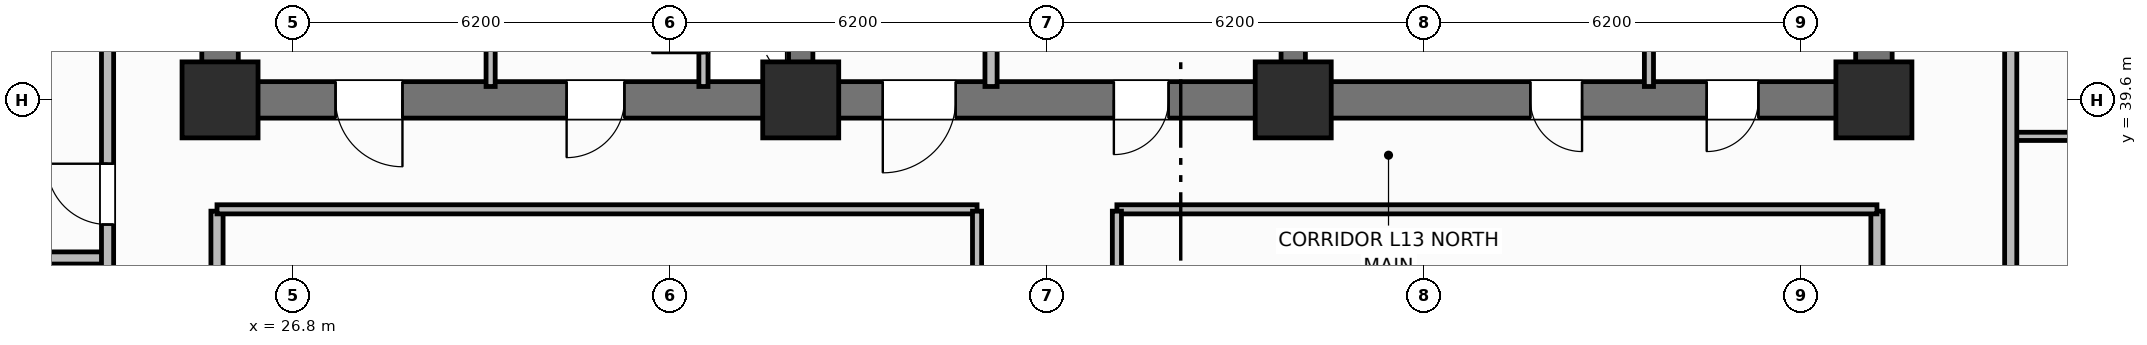
"""IFC4 building model, lengths in metres.
Left out: names, types, materials, properties, quantities, classifications, styles, units other than length and angle.
Written with IfcOpenShell. Run it as: python <this file> out.ifc"""

import sys

from ifc_helpers import new_model, si_unit, direction, frame, frame_2d, origin, origin_2d, place, context, subcontext, project, spatial, rectangle, extrude, element, fill, save


model = new_model("IFC4")
c1 = context("Model", 3, precision=1e-05, world=origin(), true_north=direction((0.0, 1.0)))
c2 = subcontext(c1, "Body", "Model", "MODEL_VIEW")
j1 = project(units=[si_unit("LENGTHUNIT", "METRE"), si_unit("PLANEANGLEUNIT", "RADIAN")], contexts=[c1])
p1 = place(None, origin())
s1 = spatial("IfcSite", under=j1, at=p1, CompositionType="ELEMENT")
p2 = place(p1, origin())
s2 = spatial("IfcBuilding", under=s1, at=p2, CompositionType="ELEMENT")
p3 = place(p2, frame((0.0, 0.0, 54.7)))
s3 = spatial("IfcBuildingStorey", under=s2, at=p3, CompositionType="ELEMENT", Elevation=54.7)
for number, where, z_axis, x_axis in (
    (1, (25.6, 39.9, 0.0), (0.0, 0.0, 1.0), (0.0, 1.0, 0.0)),
    (2, (52.8, 39.9, 0.0), (0.0, 0.0, 1.0), (0.0, 1.0, 0.0)),
):
    element("IfcWall", number, at=place(p3, frame(where, z_axis=z_axis, x_axis=x_axis)), inside=s3, PredefinedType="SHEAR", context=c2, shape_type="SweptSolid", body=[
        extrude(rectangle(XDim=5.6, YDim=0.6, at=frame_2d((2.8, 0.0))), origin(), (0.0, 0.0, 1.0), 3.7),
    ])
p4 = place(p3, frame((52.8, 39.6, 0.0), z_axis=(0.0, 0.0, 1.0), x_axis=(-1.0, 0.0, 0.0)))
e3 = element("IfcWall", 3, at=p4, inside=s3, PredefinedType="SHEAR", context=c2, shape_type="SweptSolid", body=[
    extrude(rectangle(XDim=27.2, YDim=0.6, at=frame_2d((13.6, 0.0))), origin(), (0.0, 0.0, 1.0), 3.7),
])
p5 = place(p4, frame((24.2, 0.0, 0.0)))
e4 = element("IfcOpeningElement", 4, at=p5, cuts=e3, PredefinedType="OPENING", context=c2, shape_type="SweptSolid", body=[
    extrude(rectangle(XDim=1.1, YDim=2.15, at=frame_2d((0.55, 1.075))), frame((0.0, 0.31, 0.0), z_axis=(0.0, -1.0, 0.0), x_axis=(1.0, 0.0, 0.0)), (0.0, 0.0, 1.0), 0.62),
])
p6 = place(p4, frame((20.55, 0.0, 0.0)))
e5 = element("IfcOpeningElement", 5, at=p6, cuts=e3, PredefinedType="OPENING", context=c2, shape_type="SweptSolid", body=[
    extrude(rectangle(XDim=0.95, YDim=2.1, at=frame_2d((0.475, 1.05))), frame((0.0, 0.31, 0.0), z_axis=(0.0, -1.0, 0.0), x_axis=(1.0, 0.0, 0.0)), (0.0, 0.0, 1.0), 0.62),
])
p7 = place(p4, frame((15.1, 0.0, 0.0)))
e6 = element("IfcOpeningElement", 6, at=p7, cuts=e3, PredefinedType="OPENING", context=c2, shape_type="SweptSolid", body=[
    extrude(rectangle(XDim=1.2, YDim=2.15, at=frame_2d((0.6, 1.075))), frame((0.0, 0.31, 0.0), z_axis=(0.0, -1.0, 0.0), x_axis=(1.0, 0.0, 0.0)), (0.0, 0.0, 1.0), 0.62),
])
p8 = place(p4, frame((11.6, 0.0, 0.0)))
e7 = element("IfcOpeningElement", 7, at=p8, cuts=e3, PredefinedType="OPENING", context=c2, shape_type="SweptSolid", body=[
    extrude(rectangle(XDim=0.9, YDim=2.1, at=frame_2d((0.45, 1.05))), frame((0.0, 0.31, 0.0), z_axis=(0.0, -1.0, 0.0), x_axis=(1.0, 0.0, 0.0)), (0.0, 0.0, 1.0), 0.62),
])
p9 = place(p4, frame((4.8, 0.0, 0.0)))
e8 = element("IfcOpeningElement", 8, at=p9, cuts=e3, PredefinedType="OPENING", context=c2, shape_type="SweptSolid", body=[
    extrude(rectangle(XDim=0.85, YDim=2.1, at=frame_2d((0.425, 1.05))), frame((0.0, 0.31, 0.0), z_axis=(0.0, -1.0, 0.0), x_axis=(1.0, 0.0, 0.0)), (0.0, 0.0, 1.0), 0.62),
])
p10 = place(p4, frame((1.9, 0.0, 0.0)))
e9 = element("IfcOpeningElement", 9, at=p10, cuts=e3, PredefinedType="OPENING", context=c2, shape_type="SweptSolid", body=[
    extrude(rectangle(XDim=0.85, YDim=2.1, at=frame_2d((0.425, 1.05))), frame((0.0, 0.31, 0.0), z_axis=(0.0, -1.0, 0.0), x_axis=(1.0, 0.0, 0.0)), (0.0, 0.0, 1.0), 0.62),
])
for number, where, z_axis, x_axis in (
    (10, (35.15, 39.9, 0.0), (0.0, 0.0, 1.0), (0.0, 1.0, 0.0)),
    (11, (43.25, 39.9, 0.0), (0.0, 0.0, 1.0), (0.0, 1.0, 0.0)),
):
    element("IfcWall", number, at=place(p3, frame(where, z_axis=z_axis, x_axis=x_axis)), inside=s3, PredefinedType="SHEAR", context=c2, shape_type="SweptSolid", body=[
        extrude(rectangle(XDim=5.6, YDim=0.4, at=frame_2d((2.8, 0.0))), origin(), (0.0, 0.0, 1.0), 3.7),
    ])
for number, where, z_axis, x_axis in (
    (12, (25.6, 39.6, 0.0), (0.0, 0.0, 1.0), (1.0, 0.0, 0.0)),
    (13, (35.15, 39.6, 0.0), (0.0, 0.0, 1.0), (1.0, 0.0, 0.0)),
    (14, (43.25, 39.6, 0.0), (0.0, 0.0, 1.0), (1.0, 0.0, 0.0)),
    (15, (52.8, 39.6, 0.0), (0.0, 0.0, 1.0), (1.0, 0.0, 0.0)),
):
    element("IfcColumn", number, at=place(p3, frame(where, z_axis=z_axis, x_axis=x_axis)), inside=s3, PredefinedType="COLUMN", context=c2, shape_type="SweptSolid", body=[
        extrude(rectangle(XDim=1.25, YDim=1.25, at=origin_2d()), origin(), (0.0, 0.0, 1.0), 3.7),
    ])
p11 = place(p3, frame((33.55, 39.82, 0.0), z_axis=(0.0, 0.0, 1.0), x_axis=(0.0, 1.0, 0.0)))
e16 = element("IfcWall", 16, at=p11, inside=s3, PredefinedType="PARTITIONING", context=c2, shape_type="SweptSolid", body=[
    extrude(rectangle(XDim=2.13, YDim=0.15, at=frame_2d((1.065, 0.0))), origin(), (0.0, 0.0, 1.0), 2.53),
])
p12 = place(p11, frame((0.55, 0.0, 0.0)))
e17 = element("IfcOpeningElement", 17, at=p12, cuts=e16, PredefinedType="OPENING", context=c2, shape_type="SweptSolid", body=[
    extrude(rectangle(XDim=0.85, YDim=2.05, at=frame_2d((0.425, 1.025))), frame((0.0, 0.085, 0.0), z_axis=(0.0, -1.0, 0.0), x_axis=(1.0, 0.0, 0.0)), (0.0, 0.0, 1.0), 0.17),
])
p13 = place(p3, frame((30.05, 39.82, 0.0), z_axis=(0.0, 0.0, 1.0), x_axis=(0.0, 1.0, 0.0)))
e18 = element("IfcWall", 18, at=p13, inside=s3, PredefinedType="PARTITIONING", context=c2, shape_type="SweptSolid", body=[
    extrude(rectangle(XDim=2.13, YDim=0.15, at=frame_2d((1.065, 0.0))), origin(), (0.0, 0.0, 1.0), 2.53),
])
p14 = place(p3, frame((38.28, 39.82, 0.0), z_axis=(0.0, 0.0, 1.0), x_axis=(0.0, 1.0, 0.0)))
e19 = element("IfcWall", 19, at=p14, inside=s3, PredefinedType="PARTITIONING", context=c2, shape_type="SweptSolid", body=[
    extrude(rectangle(XDim=2.73, YDim=0.2, at=frame_2d((1.365, 0.0))), origin(), (0.0, 0.0, 1.0), 2.53),
])
p15 = place(p3, frame((49.1, 39.82, 0.0), z_axis=(0.0, 0.0, 1.0), x_axis=(0.0, 1.0, 0.0)))
e20 = element("IfcWall", 20, at=p15, inside=s3, PredefinedType="PARTITIONING", context=c2, shape_type="SweptSolid", body=[
    extrude(rectangle(XDim=2.73, YDim=0.15, at=frame_2d((1.365, 0.0))), origin(), (0.0, 0.0, 1.0), 2.53),
])
for number, where, z_axis, x_axis in (
    (21, (25.55, 18.63, 0.0), (0.0, 0.0, 1.0), (0.0, 1.0, 0.0)),
    (22, (52.85, 18.63, 0.0), (0.0, 0.0, 1.0), (0.0, 1.0, 0.0)),
):
    element("IfcWall", number, at=place(p3, frame(where, z_axis=z_axis, x_axis=x_axis)), inside=s3, PredefinedType="PARTITIONING", context=c2, shape_type="SweptSolid", body=[
        extrude(rectangle(XDim=19.14, YDim=0.2, at=frame_2d((9.57, 0.0))), origin(), (0.0, 0.0, 1.0), 2.53),
    ])
for number, where, z_axis, x_axis in (
    (23, (25.55, 37.8, 0.0), (0.0, 0.0, 1.0), (1.0, 0.0, 0.0)),
    (24, (40.35, 37.8, 0.0), (0.0, 0.0, 1.0), (1.0, 0.0, 0.0)),
):
    element("IfcWall", number, at=place(p3, frame(where, z_axis=z_axis, x_axis=x_axis)), inside=s3, PredefinedType="PARTITIONING", context=c2, shape_type="SweptSolid", body=[
        extrude(rectangle(XDim=12.5, YDim=0.15, at=frame_2d((6.25, 0.0))), origin(), (0.0, 0.0, 1.0), 2.53),
    ])
p16 = place(p3, frame((38.05, 18.63, 0.0), z_axis=(0.0, 0.0, 1.0), x_axis=(0.0, 1.0, 0.0)))
e25 = element("IfcWall", 25, at=p16, inside=s3, PredefinedType="PARTITIONING", context=c2, shape_type="SweptSolid", body=[
    extrude(rectangle(XDim=19.14, YDim=0.15, at=frame_2d((9.57, 0.0))), origin(), (0.0, 0.0, 1.0), 2.53),
])
p17 = place(p16, frame((2.2, 0.0, 0.0)))
e26 = element("IfcOpeningElement", 26, at=p17, cuts=e25, PredefinedType="OPENING", context=c2, shape_type="SweptSolid", body=[
    extrude(rectangle(XDim=1.0, YDim=2.15, at=frame_2d((0.5, 1.075))), frame((0.0, 0.085, 0.0), z_axis=(0.0, -1.0, 0.0), x_axis=(1.0, 0.0, 0.0)), (0.0, 0.0, 1.0), 0.17),
])
p18 = place(p16, frame((10.604, 0.0, 0.0)))
e27 = element("IfcOpeningElement", 27, at=p18, cuts=e25, PredefinedType="OPENING", context=c2, shape_type="SweptSolid", body=[
    extrude(rectangle(XDim=1.0, YDim=2.15, at=frame_2d((0.5, 1.075))), frame((0.0, 0.085, 0.0), z_axis=(0.0, -1.0, 0.0), x_axis=(1.0, 0.0, 0.0)), (0.0, 0.0, 1.0), 0.17),
])
p19 = place(p3, frame((40.35, 18.63, 0.0), z_axis=(0.0, 0.0, 1.0), x_axis=(0.0, 1.0, 0.0)))
e28 = element("IfcWall", 28, at=p19, inside=s3, PredefinedType="PARTITIONING", context=c2, shape_type="SweptSolid", body=[
    extrude(rectangle(XDim=19.14, YDim=0.15, at=frame_2d((9.57, 0.0))), origin(), (0.0, 0.0, 1.0), 2.53),
])
p20 = place(p19, frame((2.2, 0.0, 0.0)))
e29 = element("IfcOpeningElement", 29, at=p20, cuts=e28, PredefinedType="OPENING", context=c2, shape_type="SweptSolid", body=[
    extrude(rectangle(XDim=1.0, YDim=2.15, at=frame_2d((0.5, 1.075))), frame((0.0, 0.085, 0.0), z_axis=(0.0, -1.0, 0.0), x_axis=(1.0, 0.0, 0.0)), (0.0, 0.0, 1.0), 0.17),
])
p21 = place(p19, frame((10.604, 0.0, 0.0)))
e30 = element("IfcOpeningElement", 30, at=p21, cuts=e28, PredefinedType="OPENING", context=c2, shape_type="SweptSolid", body=[
    extrude(rectangle(XDim=0.9, YDim=2.1, at=frame_2d((0.45, 1.05))), frame((0.0, 0.085, 0.0), z_axis=(0.0, -1.0, 0.0), x_axis=(1.0, 0.0, 0.0)), (0.0, 0.0, 1.0), 0.17),
])
p22 = place(p3, frame((14.57, 37.0, 0.0), z_axis=(0.0, 0.0, 1.0), x_axis=(1.0, 0.0, 0.0)))
e31 = element("IfcWall", 31, at=p22, inside=s3, PredefinedType="PARTITIONING", context=c2, shape_type="SweptSolid", body=[
    extrude(rectangle(XDim=9.18, YDim=0.2, at=frame_2d((4.59, 0.0))), origin(), (0.0, 0.0, 1.0), 2.53),
])
p23 = place(p3, frame((23.75, 10.6, 0.0), z_axis=(0.0, 0.0, 1.0), x_axis=(0.0, 1.0, 0.0)))
e32 = element("IfcWall", 32, at=p23, inside=s3, PredefinedType="PARTITIONING", context=c2, shape_type="SweptSolid", body=[
    extrude(rectangle(XDim=35.2, YDim=0.2, at=frame_2d((17.6, 0.0))), origin(), (0.0, 0.0, 1.0), 2.53),
])
p24 = place(p23, frame((2.65, 0.0, 0.0)))
e33 = element("IfcOpeningElement", 33, at=p24, cuts=e32, PredefinedType="OPENING", context=c2, shape_type="SweptSolid", body=[
    extrude(rectangle(XDim=1.0, YDim=2.15, at=frame_2d((0.5, 1.075))), frame((0.0, 0.11, 0.0), z_axis=(0.0, -1.0, 0.0), x_axis=(1.0, 0.0, 0.0)), (0.0, 0.0, 1.0), 0.22),
])
p25 = place(p23, frame((10.81, 0.0, 0.0)))
e34 = element("IfcOpeningElement", 34, at=p25, cuts=e32, PredefinedType="OPENING", context=c2, shape_type="SweptSolid", body=[
    extrude(rectangle(XDim=1.0, YDim=2.15, at=frame_2d((0.5, 1.075))), frame((0.0, 0.11, 0.0), z_axis=(0.0, -1.0, 0.0), x_axis=(1.0, 0.0, 0.0)), (0.0, 0.0, 1.0), 0.22),
])
p26 = place(p23, frame((19.54, 0.0, 0.0)))
e35 = element("IfcOpeningElement", 35, at=p26, cuts=e32, PredefinedType="OPENING", context=c2, shape_type="SweptSolid", body=[
    extrude(rectangle(XDim=1.0, YDim=2.15, at=frame_2d((0.5, 1.075))), frame((0.0, 0.11, 0.0), z_axis=(0.0, -1.0, 0.0), x_axis=(1.0, 0.0, 0.0)), (0.0, 0.0, 1.0), 0.22),
])
p27 = place(p23, frame((26.95, 0.0, 0.0)))
e36 = element("IfcOpeningElement", 36, at=p27, cuts=e32, PredefinedType="OPENING", context=c2, shape_type="SweptSolid", body=[
    extrude(rectangle(XDim=1.0, YDim=2.15, at=frame_2d((0.5, 1.075))), frame((0.0, 0.11, 0.0), z_axis=(0.0, -1.0, 0.0), x_axis=(1.0, 0.0, 0.0)), (0.0, 0.0, 1.0), 0.22),
])
p28 = place(p3, frame((55.05, 39.0, 0.0), z_axis=(0.0, 0.0, 1.0), x_axis=(1.0, 0.0, 0.0)))
e37 = element("IfcWall", 37, at=p28, inside=s3, PredefinedType="PARTITIONING", context=c2, shape_type="SweptSolid", body=[
    extrude(rectangle(XDim=2.25, YDim=0.135, at=frame_2d((1.125, 0.0))), origin(), (0.0, 0.0, 1.0), 2.53),
])
p29 = place(p3, frame((55.05, 10.6, 0.0), z_axis=(0.0, 0.0, 1.0), x_axis=(0.0, 1.0, 0.0)))
e38 = element("IfcWall", 38, at=p29, inside=s3, PredefinedType="PARTITIONING", context=c2, shape_type="SweptSolid", body=[
    extrude(rectangle(XDim=35.2, YDim=0.2, at=frame_2d((17.6, 0.0))), origin(), (0.0, 0.0, 1.0), 2.53),
])
p30 = place(p29, frame((2.65, 0.0, 0.0)))
e39 = element("IfcOpeningElement", 39, at=p30, cuts=e38, PredefinedType="OPENING", context=c2, shape_type="SweptSolid", body=[
    extrude(rectangle(XDim=1.0, YDim=2.15, at=frame_2d((0.5, 1.075))), frame((0.0, 0.11, 0.0), z_axis=(0.0, -1.0, 0.0), x_axis=(1.0, 0.0, 0.0)), (0.0, 0.0, 1.0), 0.22),
])
p31 = place(p29, frame((22.75, 0.0, 0.0)))
e40 = element("IfcOpeningElement", 40, at=p31, cuts=e38, PredefinedType="OPENING", context=c2, shape_type="SweptSolid", body=[
    extrude(rectangle(XDim=1.0, YDim=2.15, at=frame_2d((0.5, 1.075))), frame((0.0, 0.11, 0.0), z_axis=(0.0, -1.0, 0.0), x_axis=(1.0, 0.0, 0.0)), (0.0, 0.0, 1.0), 0.22),
])
p32 = place(p12, origin())
e41 = element("IfcDoor", 41, at=p32, inside=s3, OperationType="SINGLE_SWING_LEFT", PredefinedType="TRAPDOOR", context=c2, shape_type="SweptSolid", body=[
    extrude(rectangle(XDim=0.85, YDim=2.05, at=frame_2d((0.425, 1.025))), frame((0.0, 0.025, 0.0), z_axis=(0.0, -1.0, 0.0), x_axis=(1.0, 0.0, 0.0)), (0.0, 0.0, 1.0), 0.05),
])
fill(e17, e41)
p33 = place(p27, origin())
e42 = element("IfcDoor", 42, at=p33, inside=s3, OperationType="SINGLE_SWING_RIGHT", PredefinedType="DOOR", context=c2, shape_type="SweptSolid", body=[
    extrude(rectangle(XDim=1.0, YDim=2.15, at=frame_2d((0.5, 1.075))), frame((0.0, 0.025, 0.0), z_axis=(0.0, -1.0, 0.0), x_axis=(1.0, 0.0, 0.0)), (0.0, 0.0, 1.0), 0.05),
])
fill(e36, e42)
p34 = place(p5, origin())
e43 = element("IfcDoor", 43, at=p34, inside=s3, OperationType="SINGLE_SWING_LEFT", PredefinedType="DOOR", context=c2, shape_type="SweptSolid", body=[
    extrude(rectangle(XDim=1.1, YDim=2.15, at=frame_2d((0.55, 1.075))), frame((0.0, 0.025, 0.0), z_axis=(0.0, -1.0, 0.0), x_axis=(1.0, 0.0, 0.0)), (0.0, 0.0, 1.0), 0.05),
])
fill(e4, e43)
p35 = place(p6, origin())
e44 = element("IfcDoor", 44, at=p35, inside=s3, OperationType="SINGLE_SWING_RIGHT", PredefinedType="DOOR", context=c2, shape_type="SweptSolid", body=[
    extrude(rectangle(XDim=0.95, YDim=2.1, at=frame_2d((0.475, 1.05))), frame((0.0, 0.025, 0.0), z_axis=(0.0, -1.0, 0.0), x_axis=(1.0, 0.0, 0.0)), (0.0, 0.0, 1.0), 0.05),
])
fill(e5, e44)
p36 = place(p7, origin())
e45 = element("IfcDoor", 45, at=p36, inside=s3, OperationType="SINGLE_SWING_RIGHT", PredefinedType="DOOR", context=c2, shape_type="SweptSolid", body=[
    extrude(rectangle(XDim=1.2, YDim=2.15, at=frame_2d((0.6, 1.075))), frame((0.0, 0.025, 0.0), z_axis=(0.0, -1.0, 0.0), x_axis=(1.0, 0.0, 0.0)), (0.0, 0.0, 1.0), 0.05),
])
fill(e6, e45)
p37 = place(p8, origin())
e46 = element("IfcDoor", 46, at=p37, inside=s3, OperationType="SINGLE_SWING_RIGHT", PredefinedType="DOOR", context=c2, shape_type="SweptSolid", body=[
    extrude(rectangle(XDim=0.9, YDim=2.1, at=frame_2d((0.45, 1.05))), frame((0.0, 0.025, 0.0), z_axis=(0.0, -1.0, 0.0), x_axis=(1.0, 0.0, 0.0)), (0.0, 0.0, 1.0), 0.05),
])
fill(e7, e46)
p38 = place(p9, origin())
e47 = element("IfcDoor", 47, at=p38, inside=s3, OperationType="SINGLE_SWING_LEFT", PredefinedType="DOOR", context=c2, shape_type="SweptSolid", body=[
    extrude(rectangle(XDim=0.85, YDim=2.1, at=frame_2d((0.425, 1.05))), frame((0.0, 0.025, 0.0), z_axis=(0.0, -1.0, 0.0), x_axis=(1.0, 0.0, 0.0)), (0.0, 0.0, 1.0), 0.05),
])
fill(e8, e47)
p39 = place(p10, origin())
e48 = element("IfcDoor", 48, at=p39, inside=s3, OperationType="SINGLE_SWING_RIGHT", PredefinedType="DOOR", context=c2, shape_type="SweptSolid", body=[
    extrude(rectangle(XDim=0.85, YDim=2.1, at=frame_2d((0.425, 1.05))), frame((0.0, 0.025, 0.0), z_axis=(0.0, -1.0, 0.0), x_axis=(1.0, 0.0, 0.0)), (0.0, 0.0, 1.0), 0.05),
])
fill(e9, e48)
save(model, sys.argv[1])
